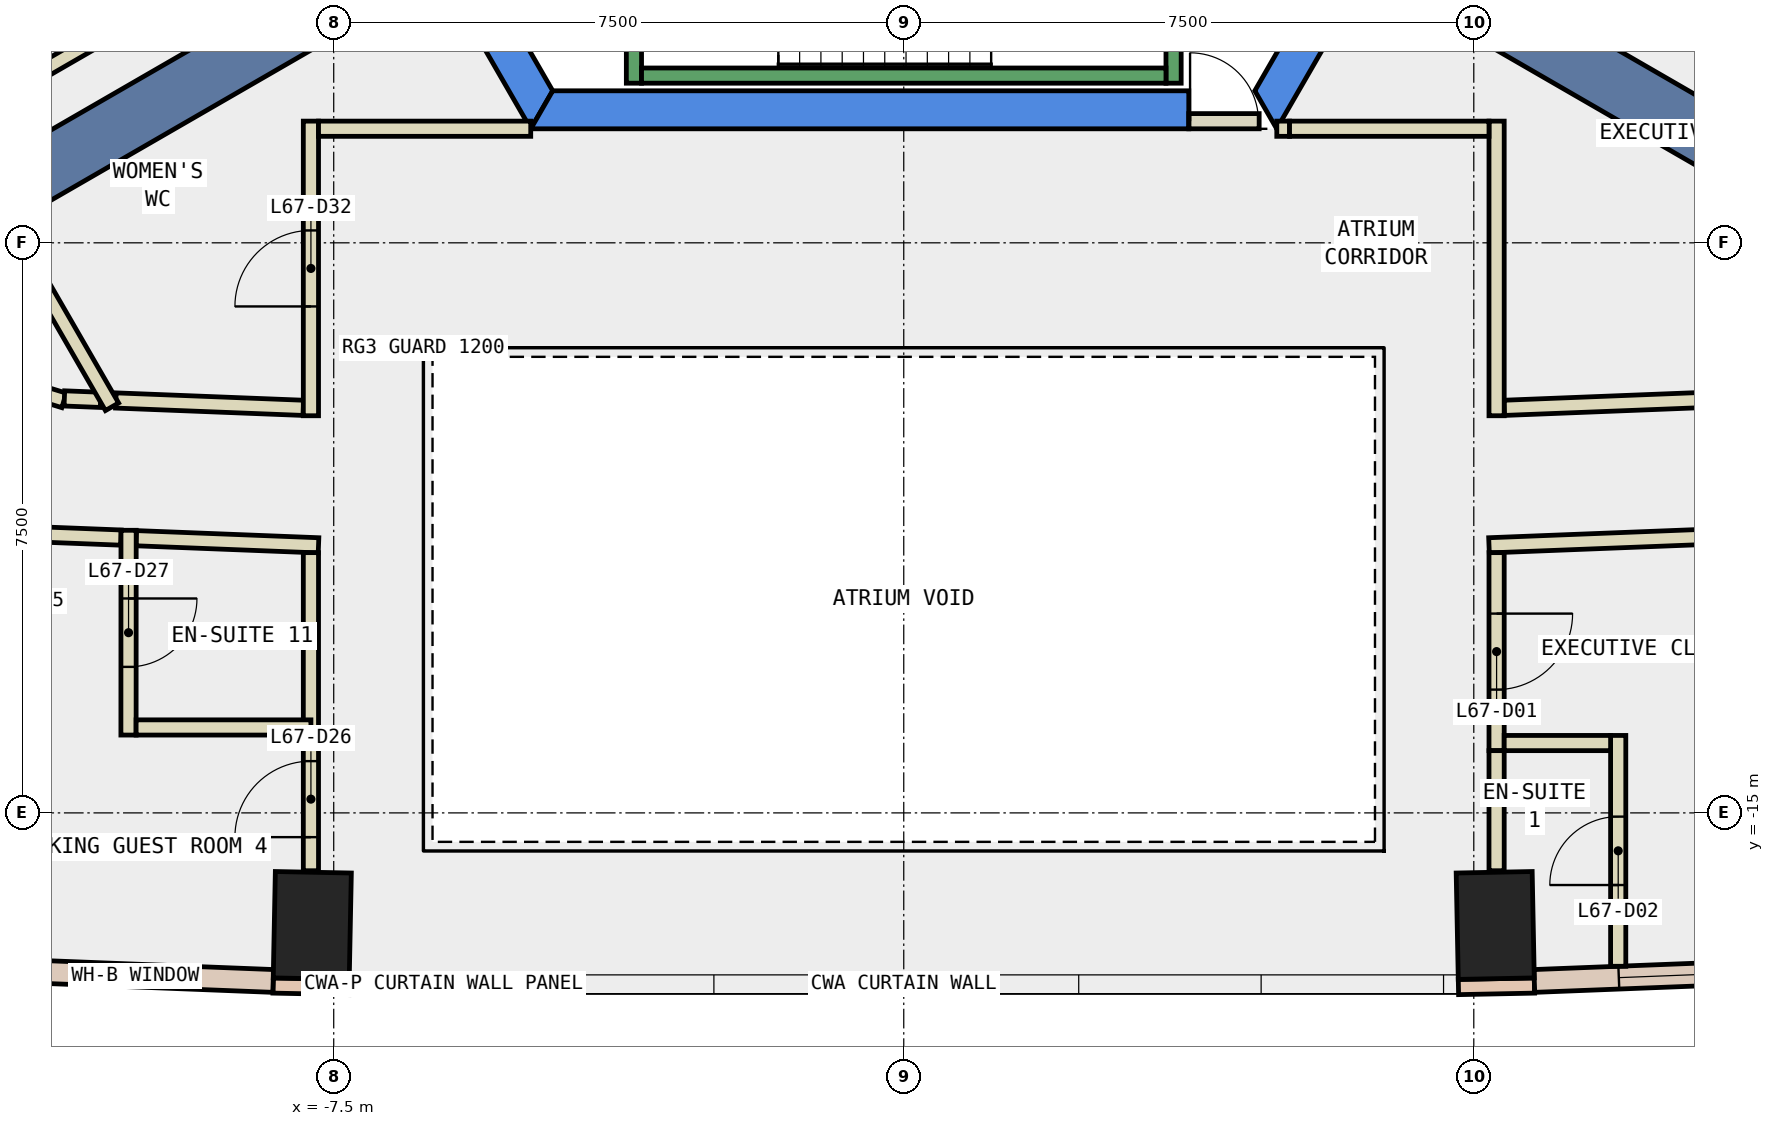
"""IFC4 building model, lengths in metres.
Left out: names, types, materials, properties, quantities, classifications, styles, units other than length and angle.
Written with IfcOpenShell. Run it as: python <this file> out.ifc"""

import sys

from ifc_helpers import new_model, si_unit, direction, frame, frame_2d, origin, origin_2d, place, context, subcontext, project, spatial, polyline, rectangle, outline, extrude, element, fill, save


model = new_model("IFC4")
c1 = context("Model", 3, precision=1e-05, world=origin(), true_north=direction((0.0, 1.0)))
c2 = subcontext(c1, "Body", "Model", "MODEL_VIEW")
j1 = project(units=[si_unit("LENGTHUNIT", "METRE"), si_unit("PLANEANGLEUNIT", "RADIAN")], contexts=[c1])
p1 = place(None, origin())
s1 = spatial("IfcSite", under=j1, at=p1, CompositionType="ELEMENT")
p2 = place(p1, origin())
s2 = spatial("IfcBuilding", under=s1, at=p2, CompositionType="ELEMENT")
p3 = place(p2, frame((0.0, 0.0, 290.0)))
s3 = spatial("IfcBuildingStorey", under=s2, at=p3, CompositionType="ELEMENT", Elevation=290.0)
for number, where, z_axis, x_axis in (
    (1, (-7.782, -16.481, -0.34), (0.0, 0.0, 1.0), (-1.0, 0.02, 0.0)),
    (2, (7.782, -16.481, -0.34), (0.0, 0.0, 1.0), (1.0, 0.02, 0.0)),
):
    element("IfcColumn", number, at=place(p3, frame(where, z_axis=z_axis, x_axis=x_axis)), inside=s3, PredefinedType="COLUMN", context=c2, shape_type="SweptSolid", body=[
        extrude(rectangle(XDim=1.0, YDim=1.4, at=origin_2d()), origin(), (0.0, 0.0, 1.0), 3.6),
    ])
p4 = place(p3, frame((0.0, 0.0, -0.34)))
e3 = element("IfcWall", 3, at=p4, inside=s3, PredefinedType="SHEAR", context=c2, shape_type="SweptSolid", body=[
    extrude(outline(polyline([(-9.815, 2.5), (-4.907, -6.0), (-4.619, -5.5), (-9.238, 2.5), (-9.815, 2.5)])), origin(), (0.0, 0.0, 1.0), 3.6),
])
p5 = place(p3, frame((0.0, 0.0, -0.34)))
e4 = element("IfcWall", 4, at=p5, inside=s3, PredefinedType="SHEAR", context=c2, shape_type="SweptSolid", body=[
    extrude(outline(polyline([(3.75, -6.0), (3.75, -5.5), (-4.619, -5.5), (-4.907, -6.0), (3.75, -6.0)])), origin(), (0.0, 0.0, 1.0), 3.6),
])
p6 = place(p3, frame((0.0, 0.0, -0.34)))
e5 = element("IfcWall", 5, at=p6, inside=s3, PredefinedType="SHEAR", context=c2, shape_type="SweptSolid", body=[
    extrude(outline(polyline([(4.907, -6.0), (9.815, 2.5), (9.238, 2.5), (4.619, -5.5), (4.907, -6.0)])), origin(), (0.0, 0.0, 1.0), 3.6),
])
for number, where, z_axis, x_axis in (
    (6, (6.279, -3.625, -0.34), (0.0, 0.0, 1.0), (0.866, -0.5, 0.0)),
    (7, (-6.279, -3.625, -0.34), (0.0, 0.0, 1.0), (-0.866, -0.5, 0.0)),
):
    element("IfcWall", number, at=place(p3, frame(where, z_axis=z_axis, x_axis=x_axis)), inside=s3, PredefinedType="SHEAR", context=c2, shape_type="SweptSolid", body=[
        extrude(rectangle(XDim=9.0, YDim=0.8, at=frame_2d((4.5, 0.0))), origin(), (0.0, 0.0, 1.0), 3.6),
    ])
for number, where, z_axis, x_axis in (
    (8, (-8.298, -17.271, 0.0), (0.0, 0.0, 1.0), (1.0, -0.02, 0.0)),
    (9, (7.298, -17.291, 0.0), (0.0, 0.0, 1.0), (1.0, 0.02, 0.0)),
):
    element("IfcWall", number, at=place(p3, frame(where, z_axis=z_axis, x_axis=x_axis)), inside=s3, PredefinedType="STANDARD", context=c2, shape_type="SweptSolid", body=[
        extrude(rectangle(XDim=1.0, YDim=0.2, at=frame_2d((0.5, 0.0))), origin(), (0.0, 0.0, 1.0), 3.26),
    ])
p7 = place(p3, frame((-11.92, -17.069, 0.0), z_axis=(0.0, 0.0, 1.0), x_axis=(0.999234893779, -0.039110446866, 0.0)))
e10 = element("IfcWall", 10, at=p7, inside=s3, PredefinedType="STANDARD", context=c2, shape_type="SweptSolid", body=[
    extrude(rectangle(XDim=3.627, YDim=0.3, at=frame_2d((1.813, 0.0))), origin(), (0.0, 0.0, 1.0), 3.26),
])
p8 = place(p7, frame((1.113, 0.0, 0.9)))
e11 = element("IfcOpeningElement", 11, at=p8, cuts=e10, PredefinedType="OPENING", context=c2, shape_type="SweptSolid", body=[
    extrude(rectangle(XDim=1.4, YDim=2.0, at=frame_2d((0.7, 1.0))), frame((0.0, 0.16, 0.0), z_axis=(0.0, -1.0, 0.0), x_axis=(1.0, 0.0, 0.0)), (0.0, 0.0, 1.0), 0.32),
])
p9 = place(p3, frame((8.296, -17.211, 0.0), z_axis=(0.0, 0.0, 1.0), x_axis=(0.999234893779, 0.039110446866, 0.0)))
e12 = element("IfcWall", 12, at=p9, inside=s3, PredefinedType="STANDARD", context=c2, shape_type="SweptSolid", body=[
    extrude(rectangle(XDim=3.627, YDim=0.3, at=frame_2d((1.813, 0.0))), origin(), (0.0, 0.0, 1.0), 3.26),
])
p10 = place(p9, frame((1.113, 0.0, 0.9)))
e13 = element("IfcOpeningElement", 13, at=p10, cuts=e12, PredefinedType="OPENING", context=c2, shape_type="SweptSolid", body=[
    extrude(rectangle(XDim=1.4, YDim=2.0, at=frame_2d((0.7, 1.0))), frame((0.0, 0.16, 0.0), z_axis=(0.0, -1.0, 0.0), x_axis=(1.0, 0.0, 0.0)), (0.0, 0.0, 1.0), 0.32),
])
p11 = place(p3, frame((7.9, -9.671, 0.0), z_axis=(0.0, 0.0, 1.0), x_axis=(0.999223751627, 0.039394088186, 0.0)))
e14 = element("IfcWall", 14, at=p11, inside=s3, PredefinedType="PARTITIONING", context=c2, shape_type="SweptSolid", body=[
    extrude(rectangle(XDim=3.347, YDim=0.2, at=frame_2d((1.673, 0.0))), origin(), (0.0, 0.0, 1.0), 3.26),
])
p12 = place(p3, frame((13.89, -4.994, 0.0), z_axis=(0.0, 0.0, 1.0), x_axis=(-0.471713767504, 0.881751734644, 0.0)))
e15 = element("IfcWall", 15, at=p12, inside=s3, PredefinedType="PARTITIONING", context=c2, shape_type="SweptSolid", body=[
    extrude(rectangle(XDim=7.248, YDim=0.2, at=frame_2d((3.624, 0.0))), origin(), (0.0, 0.0, 1.0), 3.26),
])
p13 = place(p12, frame((2.724, 0.0, 0.0)))
e16 = element("IfcOpeningElement", 16, at=p13, cuts=e15, PredefinedType="OPENING", context=c2, shape_type="SweptSolid", body=[
    extrude(rectangle(XDim=1.8, YDim=2.1, at=frame_2d((0.9, 1.05))), frame((0.0, 0.11, 0.0), z_axis=(0.0, -1.0, 0.0), x_axis=(1.0, 0.0, 0.0)), (0.0, 0.0, 1.0), 0.22),
])
p14 = place(p3, frame((-10.367, -9.574, 0.0), z_axis=(0.0, 0.0, 1.0), x_axis=(0.999229139158, -0.039257196264, 0.0)))
e17 = element("IfcWall", 17, at=p14, inside=s3, PredefinedType="PARTITIONING", context=c2, shape_type="SweptSolid", body=[
    extrude(rectangle(XDim=2.469, YDim=0.2, at=frame_2d((1.234, 0.0))), origin(), (0.0, 0.0, 1.0), 3.26),
])
p15 = place(p3, frame((-13.275, -8.888, 0.0), z_axis=(0.0, 0.0, 1.0), x_axis=(0.955792602122, -0.294041666654, 0.0)))
e18 = element("IfcWall", 18, at=p15, inside=s3, PredefinedType="PARTITIONING", context=c2, shape_type="SweptSolid", body=[
    extrude(rectangle(XDim=2.33, YDim=0.2, at=frame_2d((1.165, 0.0))), origin(), (0.0, 0.0, 1.0), 3.26),
])
p16 = place(p15, frame((0.665, 0.0, 0.0)))
e19 = element("IfcOpeningElement", 19, at=p16, cuts=e18, PredefinedType="OPENING", context=c2, shape_type="SweptSolid", body=[
    extrude(rectangle(XDim=1.0, YDim=2.1, at=frame_2d((0.5, 1.05))), frame((0.0, 0.11, 0.0), z_axis=(0.0, -1.0, 0.0), x_axis=(1.0, 0.0, 0.0)), (0.0, 0.0, 1.0), 0.22),
])
p17 = place(p3, frame((-11.044, -9.547, 0.0), z_axis=(0.0, 0.0, 1.0), x_axis=(0.999224473046, -0.039375785274, 0.0)))
e20 = element("IfcWall", 20, at=p17, inside=s3, PredefinedType="PARTITIONING", context=c2, shape_type="SweptSolid", body=[
    extrude(rectangle(XDim=0.478, YDim=0.2, at=frame_2d((0.239, 0.0))), origin(), (0.0, 0.0, 1.0), 3.26),
])
p18 = place(p3, frame((11.474, -11.332, 0.0), z_axis=(0.0, 0.0, 1.0), x_axis=(-0.999232546126, -0.039170381199, 0.0)))
e21 = element("IfcWall", 21, at=p18, inside=s3, PredefinedType="PARTITIONING", context=c2, shape_type="SweptSolid", body=[
    extrude(rectangle(XDim=3.777, YDim=0.2, at=frame_2d((1.889, 0.0))), origin(), (0.0, 0.0, 1.0), 3.26),
])
p19 = place(p3, frame((-10.299, -11.378, 0.0), z_axis=(0.0, 0.0, 1.0), x_axis=(-0.999237995813, 0.03903111224, 0.0)))
e22 = element("IfcWall", 22, at=p19, inside=s3, PredefinedType="PARTITIONING", context=c2, shape_type="SweptSolid", body=[
    extrude(rectangle(XDim=1.176, YDim=0.2, at=frame_2d((0.588, 0.0))), origin(), (0.0, 0.0, 1.0), 3.26),
])
p20 = place(p3, frame((-7.7, -11.48, 0.0), z_axis=(0.0, 0.0, 1.0), x_axis=(-0.999233433291, 0.039147743138, 0.0)))
e23 = element("IfcWall", 23, at=p20, inside=s3, PredefinedType="PARTITIONING", context=c2, shape_type="SweptSolid", body=[
    extrude(rectangle(XDim=2.401, YDim=0.2, at=frame_2d((1.201, 0.0))), origin(), (0.0, 0.0, 1.0), 3.26),
])
p21 = place(p3, frame((4.908, -5.999, 0.0), z_axis=(0.0, 0.0, 1.0), x_axis=(1.0, 0.0, 0.0)))
e24 = element("IfcWall", 24, at=p21, inside=s3, PredefinedType="PARTITIONING", context=c2, shape_type="SweptSolid", body=[
    extrude(rectangle(XDim=0.168, YDim=0.2, at=frame_2d((0.084, 0.0))), origin(), (0.0, 0.0, 1.0), 2.4),
])
p22 = place(p3, frame((7.8, -5.899, 0.0), z_axis=(0.0, 0.0, 1.0), x_axis=(0.0, -1.0, 0.0)))
e25 = element("IfcWall", 25, at=p22, inside=s3, PredefinedType="PARTITIONING", context=c2, shape_type="SweptSolid", body=[
    extrude(rectangle(XDim=3.876, YDim=0.2, at=frame_2d((1.938, 0.0))), origin(), (0.0, 0.0, 1.0), 3.26),
])
p23 = place(p3, frame((-7.8, -9.775, 0.0), z_axis=(0.0, 0.0, 1.0), x_axis=(0.0, 1.0, 0.0)))
e26 = element("IfcWall", 26, at=p23, inside=s3, PredefinedType="PARTITIONING", context=c2, shape_type="SweptSolid", body=[
    extrude(rectangle(XDim=3.876, YDim=0.2, at=frame_2d((1.938, 0.0))), origin(), (0.0, 0.0, 1.0), 3.26),
])
p24 = place(p23, frame((1.438, 0.0, 0.0)))
e27 = element("IfcOpeningElement", 27, at=p24, cuts=e26, PredefinedType="OPENING", context=c2, shape_type="SweptSolid", body=[
    extrude(rectangle(XDim=1.0, YDim=2.1, at=frame_2d((0.5, 1.05))), frame((0.0, 0.11, 0.0), z_axis=(0.0, -1.0, 0.0), x_axis=(1.0, 0.0, 0.0)), (0.0, 0.0, 1.0), 0.22),
])
p25 = place(p3, frame((-7.7, -5.999, 0.0), z_axis=(0.0, 0.0, 1.0), x_axis=(1.0, 0.0, 0.0)))
e28 = element("IfcWall", 28, at=p25, inside=s3, PredefinedType="PARTITIONING", context=c2, shape_type="SweptSolid", body=[
    extrude(rectangle(XDim=2.792, YDim=0.2, at=frame_2d((1.396, 0.0))), origin(), (0.0, 0.0, 1.0), 3.26),
])
p26 = place(p3, frame((7.8, -11.576, 0.0), z_axis=(0.0, 0.0, 1.0), x_axis=(0.0, -1.0, 0.0)))
e29 = element("IfcWall", 29, at=p26, inside=s3, PredefinedType="PARTITIONING", context=c2, shape_type="SweptSolid", body=[
    extrude(rectangle(XDim=2.605, YDim=0.2, at=frame_2d((1.302, 0.0))), origin(), (0.0, 0.0, 1.0), 3.26),
])
p27 = place(p26, frame((0.802, 0.0, 0.0)))
e30 = element("IfcOpeningElement", 30, at=p27, cuts=e29, PredefinedType="OPENING", context=c2, shape_type="SweptSolid", body=[
    extrude(rectangle(XDim=1.0, YDim=2.1, at=frame_2d((0.5, 1.05))), frame((0.0, 0.11, 0.0), z_axis=(0.0, -1.0, 0.0), x_axis=(1.0, 0.0, 0.0)), (0.0, 0.0, 1.0), 0.22),
])
p28 = place(p3, frame((7.8, -14.181, 0.0), z_axis=(0.0, 0.0, 1.0), x_axis=(0.0, -1.0, 0.0)))
e31 = element("IfcWall", 31, at=p28, inside=s3, PredefinedType="PARTITIONING", context=c2, shape_type="SweptSolid", body=[
    extrude(rectangle(XDim=1.58, YDim=0.2, at=frame_2d((0.79, 0.0))), origin(), (0.0, 0.0, 1.0), 3.26),
])
p29 = place(p3, frame((-7.8, -15.761, 0.0), z_axis=(0.0, 0.0, 1.0), x_axis=(0.0, 1.0, 0.0)))
e32 = element("IfcWall", 32, at=p29, inside=s3, PredefinedType="PARTITIONING", context=c2, shape_type="SweptSolid", body=[
    extrude(rectangle(XDim=1.785, YDim=0.2, at=frame_2d((0.893, 0.0))), origin(), (0.0, 0.0, 1.0), 3.26),
])
p30 = place(p29, frame((0.442, 0.0, 0.0)))
e33 = element("IfcOpeningElement", 33, at=p30, cuts=e32, PredefinedType="OPENING", context=c2, shape_type="SweptSolid", body=[
    extrude(rectangle(XDim=1.0, YDim=2.1, at=frame_2d((0.5, 1.05))), frame((0.0, 0.11, 0.0), z_axis=(0.0, -1.0, 0.0), x_axis=(1.0, 0.0, 0.0)), (0.0, 0.0, 1.0), 0.22),
])
p31 = place(p3, frame((-7.8, -13.976, 0.0), z_axis=(0.0, 0.0, 1.0), x_axis=(0.0, 1.0, 0.0)))
e34 = element("IfcWall", 34, at=p31, inside=s3, PredefinedType="PARTITIONING", context=c2, shape_type="SweptSolid", body=[
    extrude(rectangle(XDim=2.4, YDim=0.2, at=frame_2d((1.2, 0.0))), origin(), (0.0, 0.0, 1.0), 3.26),
])
p32 = place(p3, frame((-6.845, -2.643, 0.0), z_axis=(0.0, 0.0, 1.0), x_axis=(-0.865994457699, -0.500053596362, 0.0)))
e35 = element("IfcWall", 35, at=p32, inside=s3, PredefinedType="PARTITIONING", context=c2, shape_type="SweptSolid", body=[
    extrude(rectangle(XDim=6.701, YDim=0.2, at=frame_2d((3.351, 0.0))), origin(), (0.0, 0.0, 1.0), 3.26),
])
p33 = place(p3, frame((-10.417, -9.657, 0.0), z_axis=(0.0, 0.0, 1.0), x_axis=(-0.499837531988, 0.866119184418, 0.0)))
e36 = element("IfcWall", 36, at=p33, inside=s3, PredefinedType="PARTITIONING", context=c2, shape_type="SweptSolid", body=[
    extrude(rectangle(XDim=2.755, YDim=0.2, at=frame_2d((1.377, 0.0))), origin(), (0.0, 0.0, 1.0), 3.26),
])
p34 = place(p3, frame((9.4, -17.018, 0.0), z_axis=(0.0, 0.0, 1.0), x_axis=(0.0, 1.0, 0.0)))
e37 = element("IfcWall", 37, at=p34, inside=s3, PredefinedType="PARTITIONING", context=c2, shape_type="SweptSolid", body=[
    extrude(rectangle(XDim=3.037, YDim=0.2, at=frame_2d((1.519, 0.0))), origin(), (0.0, 0.0, 1.0), 3.26),
])
p35 = place(p34, frame((1.069, 0.0, 0.0)))
e38 = element("IfcOpeningElement", 38, at=p35, cuts=e37, PredefinedType="OPENING", context=c2, shape_type="SweptSolid", body=[
    extrude(rectangle(XDim=0.9, YDim=2.1, at=frame_2d((0.45, 1.05))), frame((0.0, 0.11, 0.0), z_axis=(0.0, -1.0, 0.0), x_axis=(1.0, 0.0, 0.0)), (0.0, 0.0, 1.0), 0.22),
])
p36 = place(p3, frame((9.3, -14.081, 0.0), z_axis=(0.0, 0.0, 1.0), x_axis=(-1.0, 0.0, 0.0)))
e39 = element("IfcWall", 39, at=p36, inside=s3, PredefinedType="PARTITIONING", context=c2, shape_type="SweptSolid", body=[
    extrude(rectangle(XDim=1.4, YDim=0.2, at=frame_2d((0.7, 0.0))), origin(), (0.0, 0.0, 1.0), 3.26),
])
p37 = place(p3, frame((-10.199, -11.282, 0.0), z_axis=(0.0, 0.0, 1.0), x_axis=(-0.000362482985, -0.999999934303, 0.0)))
e40 = element("IfcWall", 40, at=p37, inside=s3, PredefinedType="PARTITIONING", context=c2, shape_type="SweptSolid", body=[
    extrude(rectangle(XDim=2.694, YDim=0.2, at=frame_2d((1.347, 0.0))), origin(), (0.0, 0.0, 1.0), 3.26),
])
p38 = place(p37, frame((0.897, 0.0, 0.0)))
e41 = element("IfcOpeningElement", 41, at=p38, cuts=e40, PredefinedType="OPENING", context=c2, shape_type="SweptSolid", body=[
    extrude(rectangle(XDim=0.9, YDim=2.1, at=frame_2d((0.45, 1.05))), frame((0.0, 0.11, 0.0), z_axis=(0.0, -1.0, 0.0), x_axis=(1.0, 0.0, 0.0)), (0.0, 0.0, 1.0), 0.22),
])
p39 = place(p3, frame((-10.1, -13.876, 0.0), z_axis=(0.0, 0.0, 1.0), x_axis=(1.0, 0.0, 0.0)))
e42 = element("IfcWall", 42, at=p39, inside=s3, PredefinedType="PARTITIONING", context=c2, shape_type="SweptSolid", body=[
    extrude(rectangle(XDim=2.3, YDim=0.2, at=frame_2d((1.15, 0.0))), origin(), (0.0, 0.0, 1.0), 3.26),
])
p40 = place(p3, frame((3.75, -5.9, 0.0), z_axis=(0.0, 0.0, 1.0), x_axis=(1.0, 0.0, 0.0)))
e43 = element("IfcWall", 43, at=p40, inside=s3, PredefinedType="PARTITIONING", context=c2, shape_type="SweptSolid", body=[
    extrude(rectangle(XDim=0.926, YDim=0.2, at=frame_2d((0.463, 0.0))), origin(), (0.0, 0.0, 1.0), 2.4),
])
p41 = place(p40, frame((0.017, 0.0, 0.0)))
e44 = element("IfcOpeningElement", 44, at=p41, cuts=e43, PredefinedType="OPENING", context=c2, shape_type="SweptSolid", body=[
    extrude(rectangle(XDim=0.9, YDim=2.1, at=frame_2d((0.45, 1.05))), frame((0.0, 0.11, 0.0), z_axis=(0.0, -1.0, 0.0), x_axis=(1.0, 0.0, 0.0)), (0.0, 0.0, 1.0), 0.22),
])
p42 = place(p3, frame((5.076, -5.999, 0.0), z_axis=(0.0, 0.0, 1.0), x_axis=(1.0, 0.0, 0.0)))
e45 = element("IfcWall", 45, at=p42, inside=s3, PredefinedType="PARTITIONING", context=c2, shape_type="SweptSolid", body=[
    extrude(rectangle(XDim=2.624, YDim=0.2, at=frame_2d((1.312, 0.0))), origin(), (0.0, 0.0, 1.0), 3.26),
])
p43 = place(p3, frame((-3.55, -1.0, 0.0), z_axis=(0.0, 0.0, 1.0), x_axis=(0.0, -1.0, 0.0)))
e46 = element("IfcWall", 46, at=p43, inside=s3, PredefinedType="STANDARD", context=c2, shape_type="SweptSolid", body=[
    extrude(rectangle(XDim=4.4, YDim=0.2, at=frame_2d((2.2, 0.0))), origin(), (0.0, 0.0, 1.0), 3.26),
])
p44 = place(p43, frame((2.4, 0.0, 0.0)))
e47 = element("IfcOpeningElement", 47, at=p44, cuts=e46, PredefinedType="OPENING", context=c2, shape_type="SweptSolid", body=[
    extrude(rectangle(XDim=1.1, YDim=2.2, at=frame_2d((0.55, 1.1))), frame((0.0, 0.11, 0.0), z_axis=(0.0, -1.0, 0.0), x_axis=(1.0, 0.0, 0.0)), (0.0, 0.0, 1.0), 0.22),
])
p45 = place(p3, frame((3.55, -2.667, 0.0), z_axis=(0.0, 0.0, 1.0), x_axis=(0.0, -1.0, 0.0)))
e48 = element("IfcWall", 48, at=p45, inside=s3, PredefinedType="STANDARD", context=c2, shape_type="SweptSolid", body=[
    extrude(rectangle(XDim=2.733, YDim=0.2, at=frame_2d((1.366, 0.0))), origin(), (0.0, 0.0, 1.0), 3.26),
])
p46 = place(p3, frame((-3.45, -5.3, 0.0), z_axis=(0.0, 0.0, 1.0), x_axis=(1.0, 0.0, 0.0)))
e49 = element("IfcWall", 49, at=p46, inside=s3, PredefinedType="STANDARD", context=c2, shape_type="SweptSolid", body=[
    extrude(rectangle(XDim=6.9, YDim=0.2, at=frame_2d((3.45, 0.0))), origin(), (0.0, 0.0, 1.0), 3.26),
])
p47 = place(p8, origin())
e50 = element("IfcWindow", 50, at=p47, inside=s3, PartitioningType="SINGLE_PANEL", PredefinedType="WINDOW", context=c2, shape_type="SweptSolid", body=[
    extrude(rectangle(XDim=1.4, YDim=2.0, at=frame_2d((0.7, 1.0))), frame((0.0, 0.03, 0.0), z_axis=(0.0, -1.0, 0.0), x_axis=(1.0, 0.0, 0.0)), (0.0, 0.0, 1.0), 0.06),
])
fill(e11, e50)
p48 = place(p10, origin())
e51 = element("IfcWindow", 51, at=p48, inside=s3, PartitioningType="SINGLE_PANEL", PredefinedType="WINDOW", context=c2, shape_type="SweptSolid", body=[
    extrude(rectangle(XDim=1.4, YDim=2.0, at=frame_2d((0.7, 1.0))), frame((0.0, 0.03, 0.0), z_axis=(0.0, -1.0, 0.0), x_axis=(1.0, 0.0, 0.0)), (0.0, 0.0, 1.0), 0.06),
])
fill(e13, e51)
p49 = place(p27, origin())
e52 = element("IfcDoor", 52, at=p49, inside=s3, OperationType="SINGLE_SWING_LEFT", PredefinedType="DOOR", context=c2, shape_type="SweptSolid", body=[
    extrude(rectangle(XDim=1.0, YDim=2.1, at=frame_2d((0.5, 1.05))), frame((0.0, 0.025, 0.0), z_axis=(0.0, -1.0, 0.0), x_axis=(1.0, 0.0, 0.0)), (0.0, 0.0, 1.0), 0.05),
])
fill(e30, e52)
p50 = place(p35, origin())
e53 = element("IfcDoor", 53, at=p50, inside=s3, OperationType="SINGLE_SWING_RIGHT", PredefinedType="DOOR", context=c2, shape_type="SweptSolid", body=[
    extrude(rectangle(XDim=0.9, YDim=2.1, at=frame_2d((0.45, 1.05))), frame((0.0, 0.025, 0.0), z_axis=(0.0, -1.0, 0.0), x_axis=(1.0, 0.0, 0.0)), (0.0, 0.0, 1.0), 0.05),
])
fill(e38, e53)
p51 = place(p30, origin())
e54 = element("IfcDoor", 54, at=p51, inside=s3, OperationType="SINGLE_SWING_RIGHT", PredefinedType="DOOR", context=c2, shape_type="SweptSolid", body=[
    extrude(rectangle(XDim=1.0, YDim=2.1, at=frame_2d((0.5, 1.05))), frame((0.0, 0.025, 0.0), z_axis=(0.0, -1.0, 0.0), x_axis=(1.0, 0.0, 0.0)), (0.0, 0.0, 1.0), 0.05),
])
fill(e33, e54)
p52 = place(p38, origin())
e55 = element("IfcDoor", 55, at=p52, inside=s3, OperationType="SINGLE_SWING_LEFT", PredefinedType="DOOR", context=c2, shape_type="SweptSolid", body=[
    extrude(rectangle(XDim=0.9, YDim=2.1, at=frame_2d((0.45, 1.05))), frame((0.0, 0.025, 0.0), z_axis=(0.0, -1.0, 0.0), x_axis=(1.0, 0.0, 0.0)), (0.0, 0.0, 1.0), 0.05),
])
fill(e41, e55)
p53 = place(p24, origin())
e56 = element("IfcDoor", 56, at=p53, inside=s3, OperationType="SINGLE_SWING_LEFT", PredefinedType="DOOR", context=c2, shape_type="SweptSolid", body=[
    extrude(rectangle(XDim=1.0, YDim=2.1, at=frame_2d((0.5, 1.05))), frame((0.0, 0.025, 0.0), z_axis=(0.0, -1.0, 0.0), x_axis=(1.0, 0.0, 0.0)), (0.0, 0.0, 1.0), 0.05),
])
fill(e27, e56)
p54 = place(p41, origin())
e57 = element("IfcDoor", 57, at=p54, inside=s3, OperationType="SINGLE_SWING_LEFT", PredefinedType="DOOR", context=c2, shape_type="SweptSolid", body=[
    extrude(rectangle(XDim=0.9, YDim=2.1, at=frame_2d((0.45, 1.05))), frame((0.0, 0.025, 0.0), z_axis=(0.0, -1.0, 0.0), x_axis=(1.0, 0.0, 0.0)), (0.0, 0.0, 1.0), 0.05),
])
fill(e44, e57)
save(model, sys.argv[1])
